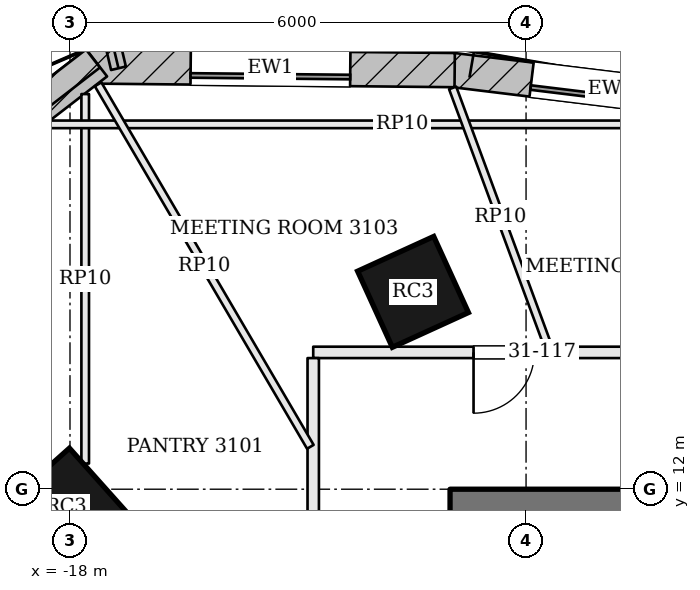
"""IFC4 building model, lengths in metres.
Left out: names, types, materials, properties, quantities, classifications, styles, units other than length and angle.
Written with IfcOpenShell. Run it as: python <this file> out.ifc"""

import sys

from ifc_helpers import new_model, si_unit, direction, frame, frame_2d, origin, origin_2d, place, context, subcontext, project, spatial, rectangle, extrude, element, fill, save


model = new_model("IFC4")
c1 = context("Model", 3, precision=1e-05, world=origin(), true_north=direction((0.0, 1.0)))
c2 = subcontext(c1, "Body", "Model", "MODEL_VIEW")
j1 = project(units=[si_unit("LENGTHUNIT", "METRE"), si_unit("PLANEANGLEUNIT", "RADIAN")], contexts=[c1])
p1 = place(None, origin())
s1 = spatial("IfcSite", under=j1, at=p1, CompositionType="ELEMENT")
p2 = place(p1, origin())
s2 = spatial("IfcBuilding", under=s1, at=p2, CompositionType="ELEMENT")
p3 = place(p2, frame((0.0, 0.0, 130.5)))
s3 = spatial("IfcBuildingStorey", under=s2, at=p3, CompositionType="ELEMENT", Elevation=130.5)
p4 = place(p3, frame((-13.0, 11.45, 0.0), z_axis=(0.0, 0.0, 1.0), x_axis=(1.0, 0.0, 0.0)))
e1 = element("IfcWall", 1, at=p4, inside=s3, PredefinedType="SHEAR", context=c2, shape_type="SweptSolid", body=[
    extrude(rectangle(XDim=26.0, YDim=1.1, at=frame_2d((13.0, 0.0))), origin(), (0.0, 0.0, 1.0), 3.9),
])
p5 = place(p4, frame((9.65, 0.0, 0.0)))
e2 = element("IfcOpeningElement", 2, at=p5, cuts=e1, PredefinedType="OPENING", context=c2, shape_type="SweptSolid", body=[
    extrude(rectangle(XDim=1.0, YDim=2.1, at=frame_2d((0.5, 1.05))), frame((0.0, 0.56, 0.0), z_axis=(0.0, -1.0, 0.0), x_axis=(1.0, 0.0, 0.0)), (0.0, 0.0, 1.0), 1.12),
])
p6 = place(p4, frame((12.675, 0.0, 0.0)))
e3 = element("IfcOpeningElement", 3, at=p6, cuts=e1, PredefinedType="OPENING", context=c2, shape_type="SweptSolid", body=[
    extrude(rectangle(XDim=0.7, YDim=2.1, at=frame_2d((0.35, 1.05))), frame((0.0, 0.56, 0.0), z_axis=(0.0, -1.0, 0.0), x_axis=(1.0, 0.0, 0.0)), (0.0, 0.0, 1.0), 1.12),
])
p7 = place(p4, frame((14.725, 0.0, 0.0)))
e4 = element("IfcOpeningElement", 4, at=p7, cuts=e1, PredefinedType="OPENING", context=c2, shape_type="SweptSolid", body=[
    extrude(rectangle(XDim=0.7, YDim=2.1, at=frame_2d((0.35, 1.05))), frame((0.0, 0.56, 0.0), z_axis=(0.0, -1.0, 0.0), x_axis=(1.0, 0.0, 0.0)), (0.0, 0.0, 1.0), 1.12),
])
p8 = place(p4, frame((16.6, 0.0, 0.0)))
e5 = element("IfcOpeningElement", 5, at=p8, cuts=e1, PredefinedType="OPENING", context=c2, shape_type="SweptSolid", body=[
    extrude(rectangle(XDim=1.0, YDim=2.1, at=frame_2d((0.5, 1.05))), frame((0.0, 0.56, 0.0), z_axis=(0.0, -1.0, 0.0), x_axis=(1.0, 0.0, 0.0)), (0.0, 0.0, 1.0), 1.12),
])
for number, where, z_axis, x_axis in (
    (6, (-13.487, 14.596, 0.0), (0.0, 0.0, 1.0), (-0.91, -0.415, 0.0)),
    (7, (-18.051, 11.763, 0.0), (0.0, 0.0, 1.0), (-0.746, -0.666, 0.0)),
):
    element("IfcColumn", number, at=place(p3, frame(where, z_axis=z_axis, x_axis=x_axis)), inside=s3, PredefinedType="COLUMN", context=c2, shape_type="SweptSolid", body=[
        extrude(rectangle(XDim=1.1, YDim=1.1, at=origin_2d()), origin(), (0.0, 0.0, 1.0), 3.9),
    ])
p9 = place(p3, frame((-8.807, 17.008, 0.0), z_axis=(0.0, 0.0, 1.0), x_axis=(-0.992654419289, 0.120984312483, 0.0)))
e8 = element("IfcWall", 8, at=p9, inside=s3, PredefinedType="SOLIDWALL", context=c2, shape_type="SweptSolid", body=[
    extrude(rectangle(XDim=4.187, YDim=0.45, at=frame_2d((2.094, 0.0))), origin(), (0.0, 0.0, 1.0), 3.7),
])
p10 = place(p9, frame((1.044, 0.0, 0.9)))
e9 = element("IfcOpeningElement", 9, at=p10, cuts=e8, PredefinedType="OPENING", context=c2, shape_type="SweptSolid", body=[
    extrude(rectangle(XDim=2.1, YDim=2.3, at=frame_2d((1.05, 1.15))), frame((0.0, 0.235, 0.0), z_axis=(0.0, -1.0, 0.0), x_axis=(1.0, 0.0, 0.0)), (0.0, 0.0, 1.0), 0.47),
])
p11 = place(p3, frame((-12.939, 17.514, 0.0), z_axis=(0.0, 0.0, 1.0), x_axis=(-0.999950280333, 0.00997180335, 0.0)))
e10 = element("IfcWall", 10, at=p11, inside=s3, PredefinedType="SOLIDWALL", context=c2, shape_type="SweptSolid", body=[
    extrude(rectangle(XDim=4.848, YDim=0.45, at=frame_2d((2.424, 0.0))), origin(), (0.0, 0.0, 1.0), 3.7),
])
p12 = place(p11, frame((1.374, 0.0, 0.9)))
e11 = element("IfcOpeningElement", 11, at=p12, cuts=e10, PredefinedType="OPENING", context=c2, shape_type="SweptSolid", body=[
    extrude(rectangle(XDim=2.1, YDim=2.3, at=frame_2d((1.05, 1.15))), frame((0.0, 0.235, 0.0), z_axis=(0.0, -1.0, 0.0), x_axis=(1.0, 0.0, 0.0)), (0.0, 0.0, 1.0), 0.47),
])
p13 = place(p3, frame((-17.649, 17.609, 0.0), z_axis=(0.0, 0.0, 1.0), x_axis=(-0.791693388686, -0.610918634771, 0.0)))
e12 = element("IfcWall", 12, at=p13, inside=s3, PredefinedType="SOLIDWALL", context=c2, shape_type="SweptSolid", body=[
    extrude(rectangle(XDim=4.1, YDim=0.45, at=frame_2d((2.05, 0.0))), origin(), (0.0, 0.0, 1.0), 3.7),
])
p14 = place(p13, frame((1.0, 0.0, 0.9)))
e13 = element("IfcOpeningElement", 13, at=p14, cuts=e12, PredefinedType="OPENING", context=c2, shape_type="SweptSolid", body=[
    extrude(rectangle(XDim=2.1, YDim=2.3, at=frame_2d((1.05, 1.15))), frame((0.0, 0.235, 0.0), z_axis=(0.0, -1.0, 0.0), x_axis=(1.0, 0.0, 0.0)), (0.0, 0.0, 1.0), 0.47),
])
p15 = place(p3, frame((-17.362, 17.538, 0.0), z_axis=(0.0, 0.0, 1.0), x_axis=(-0.230469860183, 0.973079464148, 0.0)))
e14 = element("IfcWall", 14, at=p15, inside=s3, PredefinedType="SOLIDWALL", context=c2, shape_type="SweptSolid", body=[
    extrude(rectangle(XDim=1.75, YDim=0.2, at=frame_2d((0.875, 0.0))), origin(), (0.0, 0.0, 1.0), 3.7),
])
p16 = place(p3, frame((-17.698, 17.666, 3.9), z_axis=(0.0, 0.0, 1.0), x_axis=(-0.791652356246, -0.610971805282, 0.0)))
e15 = element("IfcWall", 15, at=p16, inside=s3, PredefinedType="PARAPET", context=c2, shape_type="SweptSolid", body=[
    extrude(rectangle(XDim=3.974, YDim=0.3, at=frame_2d((1.987, 0.0))), origin(), (0.0, 0.0, 1.0), 1.1),
])
p17 = place(p3, frame((5.559, 13.8, 0.0), z_axis=(0.0, 0.0, 1.0), x_axis=(-1.0, 0.0, 0.0)))
e16 = element("IfcWall", 16, at=p17, inside=s3, PredefinedType="PARTITIONING", context=c2, shape_type="SweptSolid", body=[
    extrude(rectangle(XDim=20.359, YDim=0.15, at=frame_2d((10.18, 0.0))), origin(), (0.0, 0.0, 1.0), 3.198),
])
p18 = place(p17, frame((3.204, 0.0, 0.0)))
e17 = element("IfcOpeningElement", 17, at=p18, cuts=e16, PredefinedType="OPENING", context=c2, shape_type="SweptSolid", body=[
    extrude(rectangle(XDim=1.8, YDim=2.1, at=frame_2d((0.9, 1.05))), frame((0.0, 0.085, 0.0), z_axis=(0.0, -1.0, 0.0), x_axis=(1.0, 0.0, 0.0)), (0.0, 0.0, 1.0), 0.17),
])
p19 = place(p17, frame((8.995, 0.0, 0.0)))
e18 = element("IfcOpeningElement", 18, at=p19, cuts=e16, PredefinedType="OPENING", context=c2, shape_type="SweptSolid", body=[
    extrude(rectangle(XDim=1.0, YDim=2.4, at=frame_2d((0.5, 1.2))), frame((0.0, 0.085, 0.0), z_axis=(0.0, -1.0, 0.0), x_axis=(1.0, 0.0, 0.0)), (0.0, 0.0, 1.0), 0.17),
])
p20 = place(p17, frame((13.511, 0.0, 0.0)))
e19 = element("IfcOpeningElement", 19, at=p20, cuts=e16, PredefinedType="OPENING", context=c2, shape_type="SweptSolid", body=[
    extrude(rectangle(XDim=1.0, YDim=2.4, at=frame_2d((0.5, 1.2))), frame((0.0, 0.085, 0.0), z_axis=(0.0, -1.0, 0.0), x_axis=(1.0, 0.0, 0.0)), (0.0, 0.0, 1.0), 0.17),
])
p21 = place(p17, frame((17.45, 0.0, 0.0)))
e20 = element("IfcOpeningElement", 20, at=p21, cuts=e16, PredefinedType="OPENING", context=c2, shape_type="SweptSolid", body=[
    extrude(rectangle(XDim=0.8, YDim=2.1, at=frame_2d((0.4, 1.05))), frame((0.0, 0.085, 0.0), z_axis=(0.0, -1.0, 0.0), x_axis=(1.0, 0.0, 0.0)), (0.0, 0.0, 1.0), 0.17),
])
p22 = place(p3, frame((-14.8, 13.725, 0.0), z_axis=(0.0, 0.0, 1.0), x_axis=(0.0, -1.0, 0.0)))
e21 = element("IfcWall", 21, at=p22, inside=s3, PredefinedType="PARTITIONING", context=c2, shape_type="SweptSolid", body=[
    extrude(rectangle(XDim=9.857, YDim=0.15, at=frame_2d((4.929, 0.0))), origin(), (0.0, 0.0, 1.0), 3.198),
])
p23 = place(p22, frame((2.85, 0.0, 0.0)))
e22 = element("IfcOpeningElement", 22, at=p23, cuts=e21, PredefinedType="OPENING", context=c2, shape_type="SweptSolid", body=[
    extrude(rectangle(XDim=1.0, YDim=2.1, at=frame_2d((0.5, 1.05))), frame((0.0, 0.085, 0.0), z_axis=(0.0, -1.0, 0.0), x_axis=(1.0, 0.0, 0.0)), (0.0, 0.0, 1.0), 0.17),
])
p24 = place(p22, frame((7.05, 0.0, 0.0)))
e23 = element("IfcOpeningElement", 23, at=p24, cuts=e21, PredefinedType="OPENING", context=c2, shape_type="SweptSolid", body=[
    extrude(rectangle(XDim=1.0, YDim=2.1, at=frame_2d((0.5, 1.05))), frame((0.0, 0.085, 0.0), z_axis=(0.0, -1.0, 0.0), x_axis=(1.0, 0.0, 0.0)), (0.0, 0.0, 1.0), 0.17),
])
p25 = place(p3, frame((-17.8, 12.337, 0.0), z_axis=(0.0, 0.0, 1.0), x_axis=(0.0, 1.0, 0.0)))
e24 = element("IfcWall", 24, at=p25, inside=s3, PredefinedType="PARTITIONING", context=c2, shape_type="SweptSolid", body=[
    extrude(rectangle(XDim=4.861, YDim=0.1, at=frame_2d((2.431, 0.0))), origin(), (0.0, 0.0, 1.0), 3.184),
])
p26 = place(p3, frame((-18.319, 16.8, 0.0), z_axis=(0.0, 0.0, 1.0), x_axis=(1.0, 0.0, 0.0)))
e25 = element("IfcWall", 25, at=p26, inside=s3, PredefinedType="PARTITIONING", context=c2, shape_type="SweptSolid", body=[
    extrude(rectangle(XDim=9.381, YDim=0.1, at=frame_2d((4.69, 0.0))), origin(), (0.0, 0.0, 1.0), 3.184),
])
p27 = place(p3, frame((-11.707, 13.87, 0.0), z_axis=(0.0, 0.0, 1.0), x_axis=(-0.346436838334, 0.938073300465, 0.0)))
e26 = element("IfcWall", 26, at=p27, inside=s3, PredefinedType="PARTITIONING", context=c2, shape_type="SweptSolid", body=[
    extrude(rectangle(XDim=3.634, YDim=0.1, at=frame_2d((1.817, 0.0))), origin(), (0.0, 0.0, 1.0), 3.184),
])
p28 = place(p3, frame((-14.838, 12.558, 0.0), z_axis=(0.0, 0.0, 1.0), x_axis=(-0.505293152316, 0.862947756369, 0.0)))
e27 = element("IfcWall", 27, at=p28, inside=s3, PredefinedType="PARTITIONING", context=c2, shape_type="SweptSolid", body=[
    extrude(rectangle(XDim=5.526, YDim=0.1, at=frame_2d((2.763, 0.0))), origin(), (0.0, 0.0, 1.0), 3.184),
])
p29 = place(p10, origin())
e28 = element("IfcWindow", 28, at=p29, inside=s3, PartitioningType="SINGLE_PANEL", PredefinedType="WINDOW", context=c2, shape_type="SweptSolid", body=[
    extrude(rectangle(XDim=2.1, YDim=2.3, at=frame_2d((1.05, 1.15))), frame((0.0, 0.135, 0.0), z_axis=(0.0, -1.0, 0.0), x_axis=(1.0, 0.0, 0.0)), (0.0, 0.0, 1.0), 0.06),
])
fill(e9, e28)
p30 = place(p12, origin())
e29 = element("IfcWindow", 29, at=p30, inside=s3, PartitioningType="SINGLE_PANEL", PredefinedType="WINDOW", context=c2, shape_type="SweptSolid", body=[
    extrude(rectangle(XDim=2.1, YDim=2.3, at=frame_2d((1.05, 1.15))), frame((0.0, 0.135, 0.0), z_axis=(0.0, -1.0, 0.0), x_axis=(1.0, 0.0, 0.0)), (0.0, 0.0, 1.0), 0.06),
])
fill(e11, e29)
p31 = place(p21, origin())
e30 = element("IfcDoor", 30, at=p31, inside=s3, OperationType="SINGLE_SWING_RIGHT", PredefinedType="DOOR", context=c2, shape_type="SweptSolid", body=[
    extrude(rectangle(XDim=0.8, YDim=2.1, at=frame_2d((0.4, 1.05))), frame((0.0, 0.025, 0.0), z_axis=(0.0, -1.0, 0.0), x_axis=(1.0, 0.0, 0.0)), (0.0, 0.0, 1.0), 0.05),
])
fill(e20, e30)
save(model, sys.argv[1])
